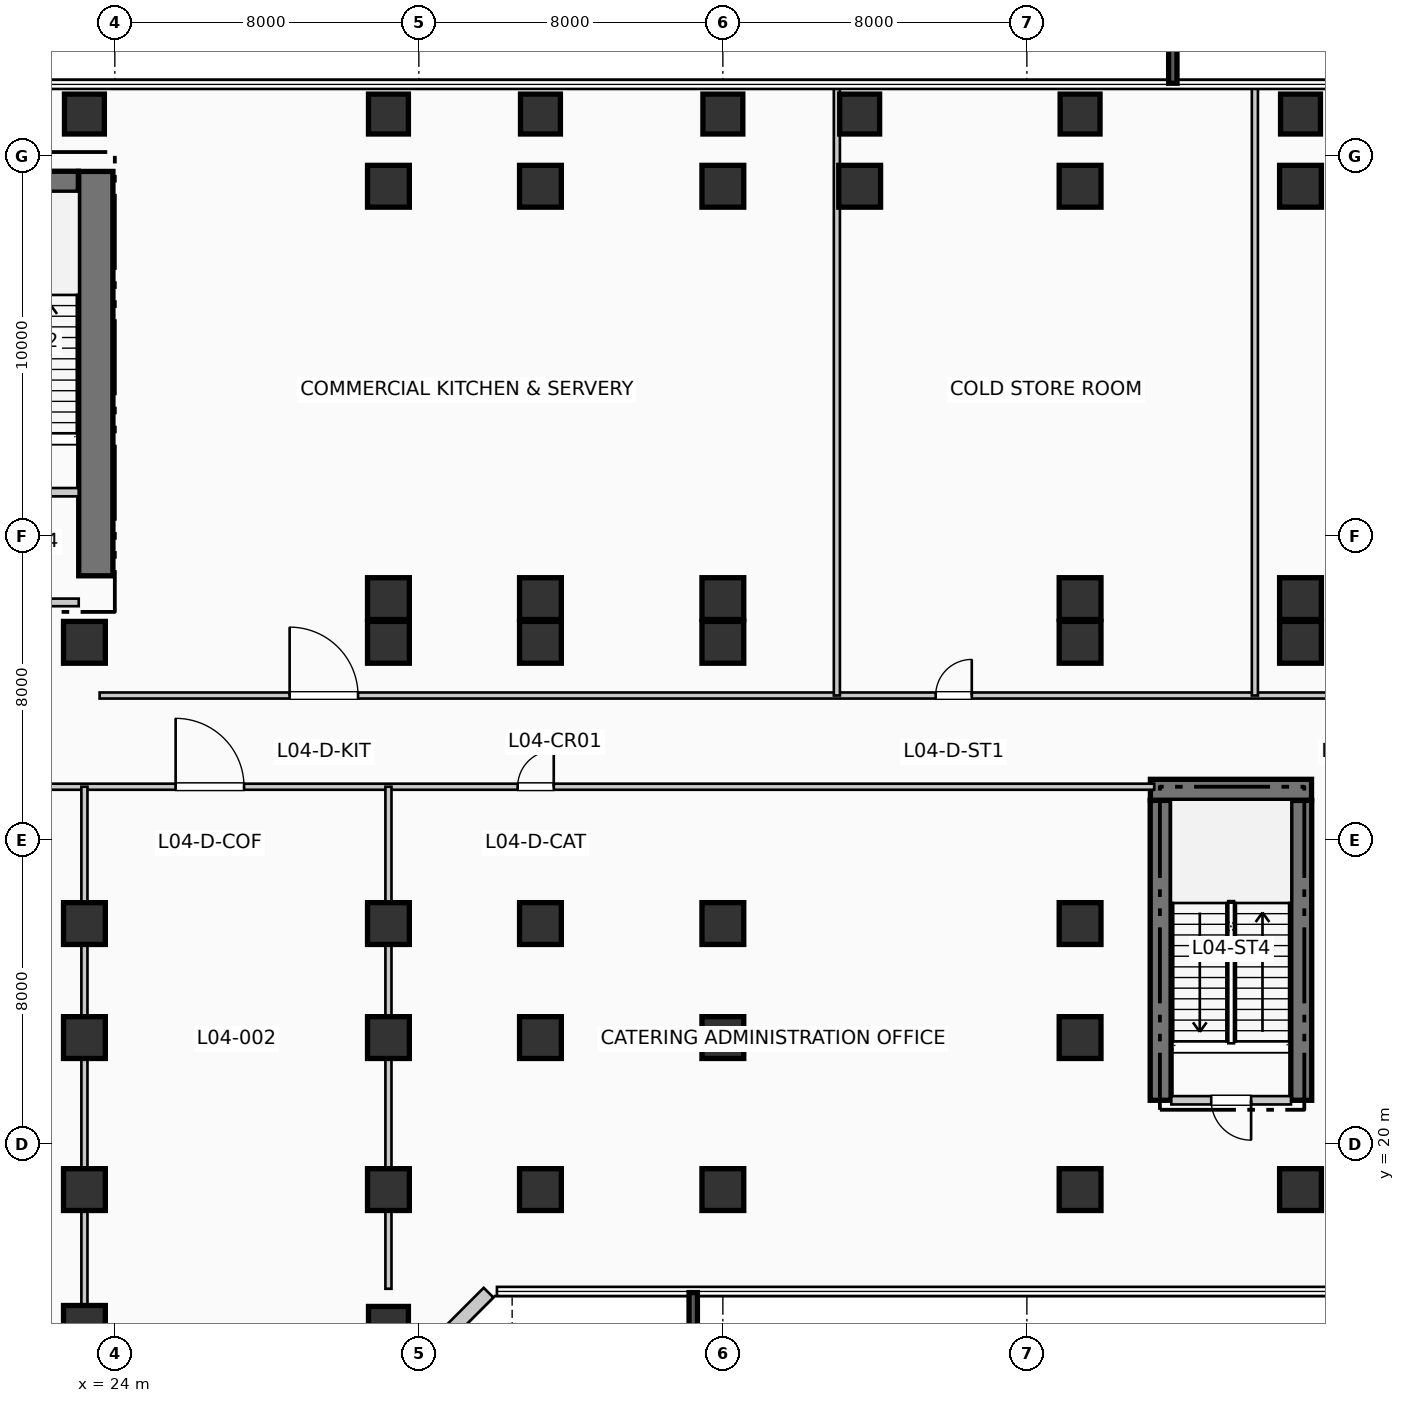
"""IFC4 building model, lengths in metres.
Left out: names, types, materials, properties, quantities, classifications, styles, units other than length and angle.
Written with IfcOpenShell. Run it as: python <this file> out.ifc"""

import sys

from ifc_helpers import new_model, si_unit, direction, frame, frame_2d, origin, origin_2d, place, context, subcontext, project, spatial, rectangle, extrude, element, fill, save


model = new_model("IFC4")
c1 = context("Model", 3, precision=1e-05, world=origin(), true_north=direction((0.0, 1.0)))
c2 = subcontext(c1, "Body", "Model", "MODEL_VIEW")
j1 = project(units=[si_unit("LENGTHUNIT", "METRE"), si_unit("PLANEANGLEUNIT", "RADIAN")], contexts=[c1])
p1 = place(None, origin())
s1 = spatial("IfcSite", under=j1, at=p1, CompositionType="ELEMENT")
p2 = place(p1, origin())
s2 = spatial("IfcBuilding", under=s1, at=p2, CompositionType="ELEMENT")
p3 = place(p2, frame((0.0, 0.0, 21.12)))
s3 = spatial("IfcBuildingStorey", under=s2, at=p3, CompositionType="ELEMENT", Elevation=21.12)
p4 = place(p3, frame((23.5, 34.95, 0.0), z_axis=(0.0, 0.0, 1.0), x_axis=(0.0, 1.0, 0.0)))
e1 = element("IfcWall", 1, at=p4, inside=s3, PredefinedType="SHEAR", context=c2, shape_type="SweptSolid", body=[
    extrude(rectangle(XDim=10.64, YDim=0.9, at=frame_2d((5.32, 0.0))), origin(), (0.0, 0.0, 1.0), 4.62),
])
p5 = place(p3, frame((19.35, 45.32, 0.0), z_axis=(0.0, 0.0, 1.0), x_axis=(1.0, 0.0, 0.0)))
e2 = element("IfcWall", 2, at=p5, inside=s3, PredefinedType="SHEAR", context=c2, shape_type="SweptSolid", body=[
    extrude(rectangle(XDim=3.69, YDim=0.55, at=frame_2d((1.845, 0.0))), origin(), (0.0, 0.0, 1.0), 4.62),
])
for number, where, z_axis, x_axis in (
    (3, (51.52, 21.15, 0.0), (0.0, 0.0, 1.0), (0.0, 1.0, 0.0)),
    (4, (55.22, 21.15, 0.0), (0.0, 0.0, 1.0), (0.0, 1.0, 0.0)),
):
    element("IfcWall", number, at=place(p3, frame(where, z_axis=z_axis, x_axis=x_axis)), inside=s3, PredefinedType="SHEAR", context=c2, shape_type="SweptSolid", body=[
        extrude(rectangle(XDim=7.89, YDim=0.55, at=frame_2d((3.945, 0.0))), origin(), (0.0, 0.0, 1.0), 4.62),
    ])
p6 = place(p3, frame((51.25, 29.32, 0.0), z_axis=(0.0, 0.0, 1.0), x_axis=(1.0, 0.0, 0.0)))
e5 = element("IfcWall", 5, at=p6, inside=s3, PredefinedType="SHEAR", context=c2, shape_type="SweptSolid", body=[
    extrude(rectangle(XDim=4.24, YDim=0.55, at=frame_2d((2.12, 0.0))), origin(), (0.0, 0.0, 1.0), 4.62),
])
for number, where, z_axis, x_axis in (
    (6, (23.2, 15.2, 0.0), (0.0, 0.0, 1.0), (1.0, 0.0, 0.0)),
    (7, (23.2, 18.8, 0.0), (0.0, 0.0, 1.0), (1.0, 0.0, 0.0)),
    (8, (23.2, 22.8, 0.0), (0.0, 0.0, 1.0), (1.0, 0.0, 0.0)),
    (9, (23.2, 25.8, 0.0), (0.0, 0.0, 1.0), (1.0, 0.0, 0.0)),
    (10, (23.2, 33.2, 0.0), (0.0, 0.0, 1.0), (1.0, 0.0, 0.0)),
):
    element("IfcColumn", number, at=place(p3, frame(where, z_axis=z_axis, x_axis=x_axis)), inside=s3, PredefinedType="COLUMN", context=c2, shape_type="SweptSolid", body=[
        extrude(rectangle(XDim=1.1, YDim=1.1, at=origin_2d()), origin(), (0.0, 0.0, 1.0), 4.62),
    ])
for number, where, z_axis, x_axis in (
    (11, (23.2, 47.1, 0.0), (0.0, 0.0, 1.0), (1.0, 0.0, 0.0)),
    (12, (31.2, 15.2, 0.0), (0.0, 0.0, 1.0), (1.0, 0.0, 0.0)),
):
    element("IfcColumn", number, at=place(p3, frame(where, z_axis=z_axis, x_axis=x_axis)), inside=s3, PredefinedType="COLUMN", context=c2, shape_type="SweptSolid", body=[
        extrude(rectangle(XDim=1.05, YDim=1.05, at=origin_2d()), origin(), (0.0, 0.0, 1.0), 4.62),
    ])
for number, where, z_axis, x_axis in (
    (13, (31.2, 18.8, 0.0), (0.0, 0.0, 1.0), (1.0, 0.0, 0.0)),
    (14, (31.2, 22.8, 0.0), (0.0, 0.0, 1.0), (1.0, 0.0, 0.0)),
    (15, (31.2, 25.8, 0.0), (0.0, 0.0, 1.0), (1.0, 0.0, 0.0)),
    (16, (31.2, 33.2, 0.0), (0.0, 0.0, 1.0), (1.0, 0.0, 0.0)),
    (17, (31.2, 34.35, 0.0), (0.0, 0.0, 1.0), (1.0, 0.0, 0.0)),
    (18, (31.2, 45.2, 0.0), (0.0, 0.0, 1.0), (1.0, 0.0, 0.0)),
):
    element("IfcColumn", number, at=place(p3, frame(where, z_axis=z_axis, x_axis=x_axis)), inside=s3, PredefinedType="COLUMN", context=c2, shape_type="SweptSolid", body=[
        extrude(rectangle(XDim=1.1, YDim=1.1, at=origin_2d()), origin(), (0.0, 0.0, 1.0), 4.62),
    ])
p7 = place(p3, frame((31.2, 47.1, 0.0), z_axis=(0.0, 0.0, 1.0), x_axis=(1.0, 0.0, 0.0)))
e19 = element("IfcColumn", 19, at=p7, inside=s3, PredefinedType="COLUMN", context=c2, shape_type="SweptSolid", body=[
    extrude(rectangle(XDim=1.05, YDim=1.05, at=origin_2d()), origin(), (0.0, 0.0, 1.0), 4.62),
])
for number, where, z_axis, x_axis in (
    (20, (35.2, 18.8, 0.0), (0.0, 0.0, 1.0), (1.0, 0.0, 0.0)),
    (21, (35.2, 22.8, 0.0), (0.0, 0.0, 1.0), (1.0, 0.0, 0.0)),
    (22, (35.2, 25.8, 0.0), (0.0, 0.0, 1.0), (1.0, 0.0, 0.0)),
    (23, (35.2, 33.2, 0.0), (0.0, 0.0, 1.0), (1.0, 0.0, 0.0)),
    (24, (35.2, 34.35, 0.0), (0.0, 0.0, 1.0), (1.0, 0.0, 0.0)),
    (25, (35.2, 45.2, 0.0), (0.0, 0.0, 1.0), (1.0, 0.0, 0.0)),
):
    element("IfcColumn", number, at=place(p3, frame(where, z_axis=z_axis, x_axis=x_axis)), inside=s3, PredefinedType="COLUMN", context=c2, shape_type="SweptSolid", body=[
        extrude(rectangle(XDim=1.1, YDim=1.1, at=origin_2d()), origin(), (0.0, 0.0, 1.0), 4.62),
    ])
p8 = place(p3, frame((35.2, 47.1, 0.0), z_axis=(0.0, 0.0, 1.0), x_axis=(1.0, 0.0, 0.0)))
e26 = element("IfcColumn", 26, at=p8, inside=s3, PredefinedType="COLUMN", context=c2, shape_type="SweptSolid", body=[
    extrude(rectangle(XDim=1.05, YDim=1.05, at=origin_2d()), origin(), (0.0, 0.0, 1.0), 4.62),
])
for number, where, z_axis, x_axis in (
    (27, (40.0, 18.8, 0.0), (0.0, 0.0, 1.0), (1.0, 0.0, 0.0)),
    (28, (40.0, 22.8, 0.0), (0.0, 0.0, 1.0), (1.0, 0.0, 0.0)),
    (29, (40.0, 25.8, 0.0), (0.0, 0.0, 1.0), (1.0, 0.0, 0.0)),
    (30, (40.0, 33.2, 0.0), (0.0, 0.0, 1.0), (1.0, 0.0, 0.0)),
    (31, (40.0, 34.35, 0.0), (0.0, 0.0, 1.0), (1.0, 0.0, 0.0)),
    (32, (40.0, 45.2, 0.0), (0.0, 0.0, 1.0), (1.0, 0.0, 0.0)),
):
    element("IfcColumn", number, at=place(p3, frame(where, z_axis=z_axis, x_axis=x_axis)), inside=s3, PredefinedType="COLUMN", context=c2, shape_type="SweptSolid", body=[
        extrude(rectangle(XDim=1.1, YDim=1.1, at=origin_2d()), origin(), (0.0, 0.0, 1.0), 4.62),
    ])
p9 = place(p3, frame((40.0, 47.1, 0.0), z_axis=(0.0, 0.0, 1.0), x_axis=(1.0, 0.0, 0.0)))
e33 = element("IfcColumn", 33, at=p9, inside=s3, PredefinedType="COLUMN", context=c2, shape_type="SweptSolid", body=[
    extrude(rectangle(XDim=1.05, YDim=1.05, at=origin_2d()), origin(), (0.0, 0.0, 1.0), 4.62),
])
p10 = place(p3, frame((43.6, 45.2, 0.0), z_axis=(0.0, 0.0, 1.0), x_axis=(1.0, 0.0, 0.0)))
e34 = element("IfcColumn", 34, at=p10, inside=s3, PredefinedType="COLUMN", context=c2, shape_type="SweptSolid", body=[
    extrude(rectangle(XDim=1.1, YDim=1.1, at=origin_2d()), origin(), (0.0, 0.0, 1.0), 4.62),
])
p11 = place(p3, frame((43.6, 47.1, 0.0), z_axis=(0.0, 0.0, 1.0), x_axis=(1.0, 0.0, 0.0)))
e35 = element("IfcColumn", 35, at=p11, inside=s3, PredefinedType="COLUMN", context=c2, shape_type="SweptSolid", body=[
    extrude(rectangle(XDim=1.05, YDim=1.05, at=origin_2d()), origin(), (0.0, 0.0, 1.0), 4.62),
])
for number, where, z_axis, x_axis in (
    (36, (49.4, 18.8, 0.0), (0.0, 0.0, 1.0), (1.0, 0.0, 0.0)),
    (37, (49.4, 22.8, 0.0), (0.0, 0.0, 1.0), (1.0, 0.0, 0.0)),
    (38, (49.4, 25.8, 0.0), (0.0, 0.0, 1.0), (1.0, 0.0, 0.0)),
    (39, (49.4, 33.2, 0.0), (0.0, 0.0, 1.0), (1.0, 0.0, 0.0)),
    (40, (49.4, 34.35, 0.0), (0.0, 0.0, 1.0), (1.0, 0.0, 0.0)),
    (41, (49.4, 45.2, 0.0), (0.0, 0.0, 1.0), (1.0, 0.0, 0.0)),
):
    element("IfcColumn", number, at=place(p3, frame(where, z_axis=z_axis, x_axis=x_axis)), inside=s3, PredefinedType="COLUMN", context=c2, shape_type="SweptSolid", body=[
        extrude(rectangle(XDim=1.1, YDim=1.1, at=origin_2d()), origin(), (0.0, 0.0, 1.0), 4.62),
    ])
p12 = place(p3, frame((49.4, 47.1, 0.0), z_axis=(0.0, 0.0, 1.0), x_axis=(1.0, 0.0, 0.0)))
e42 = element("IfcColumn", 42, at=p12, inside=s3, PredefinedType="COLUMN", context=c2, shape_type="SweptSolid", body=[
    extrude(rectangle(XDim=1.05, YDim=1.05, at=origin_2d()), origin(), (0.0, 0.0, 1.0), 4.62),
])
for number, where, z_axis, x_axis in (
    (43, (55.2, 18.8, 0.0), (0.0, 0.0, 1.0), (1.0, 0.0, 0.0)),
    (44, (55.2, 33.2, 0.0), (0.0, 0.0, 1.0), (1.0, 0.0, 0.0)),
    (45, (55.2, 34.35, 0.0), (0.0, 0.0, 1.0), (1.0, 0.0, 0.0)),
    (46, (55.2, 45.2, 0.0), (0.0, 0.0, 1.0), (1.0, 0.0, 0.0)),
):
    element("IfcColumn", number, at=place(p3, frame(where, z_axis=z_axis, x_axis=x_axis)), inside=s3, PredefinedType="COLUMN", context=c2, shape_type="SweptSolid", body=[
        extrude(rectangle(XDim=1.1, YDim=1.1, at=origin_2d()), origin(), (0.0, 0.0, 1.0), 4.62),
    ])
p13 = place(p3, frame((55.2, 47.1, 0.0), z_axis=(0.0, 0.0, 1.0), x_axis=(1.0, 0.0, 0.0)))
e47 = element("IfcColumn", 47, at=p13, inside=s3, PredefinedType="COLUMN", context=c2, shape_type="SweptSolid", body=[
    extrude(rectangle(XDim=1.05, YDim=1.05, at=origin_2d()), origin(), (0.0, 0.0, 1.0), 4.62),
])
p14 = place(p3, frame((31.912, 14.166, 0.0), z_axis=(0.0, 0.0, 1.0), x_axis=(0.707106781187, 0.707106781187, 0.0)))
e48 = element("IfcWall", 48, at=p14, inside=s3, PredefinedType="SOLIDWALL", context=c2, shape_type="SweptSolid", body=[
    extrude(rectangle(XDim=2.718, YDim=0.36, at=frame_2d((1.359, 0.0))), origin(), (0.0, 0.0, 1.0), 4.2),
])
p15 = place(p3, frame((19.9, 37.15, 0.0), z_axis=(0.0, 0.0, 1.0), x_axis=(1.0, 0.0, 0.0)))
e49 = element("IfcWall", 49, at=p15, inside=s3, PredefinedType="PARTITIONING", context=c2, shape_type="SweptSolid", body=[
    extrude(rectangle(XDim=3.15, YDim=0.22, at=frame_2d((1.575, 0.0))), origin(), (0.0, 0.0, 1.0), 4.2),
])
p16 = place(p15, frame((2.05, 0.0, 0.0), z_axis=(0.0, 0.0, 1.0), x_axis=(-1.0, 0.0, 0.0)))
e50 = element("IfcOpeningElement", 50, at=p16, cuts=e49, PredefinedType="OPENING", context=c2, shape_type="SweptSolid", body=[
    extrude(rectangle(XDim=1.05, YDim=2.15, at=frame_2d((0.525, 1.075))), frame((0.0, 0.12, 0.0), z_axis=(0.0, -1.0, 0.0), x_axis=(1.0, 0.0, 0.0)), (0.0, 0.0, 1.0), 0.24),
])
p17 = place(p3, frame((19.8, 34.25, 0.0), z_axis=(0.0, 0.0, 1.0), x_axis=(1.0, 0.0, 0.0)))
e51 = element("IfcWall", 51, at=p17, inside=s3, PredefinedType="PARTITIONING", context=c2, shape_type="SweptSolid", body=[
    extrude(rectangle(XDim=3.25, YDim=0.2, at=frame_2d((1.625, 0.0))), origin(), (0.0, 0.0, 1.0), 4.2),
])
p18 = place(p17, frame((2.15, 0.0, 0.0), z_axis=(0.0, 0.0, 1.0), x_axis=(-1.0, 0.0, 0.0)))
e52 = element("IfcOpeningElement", 52, at=p18, cuts=e51, PredefinedType="OPENING", context=c2, shape_type="SweptSolid", body=[
    extrude(rectangle(XDim=1.1, YDim=2.15, at=frame_2d((0.55, 1.075))), frame((0.0, 0.11, 0.0), z_axis=(0.0, -1.0, 0.0), x_axis=(1.0, 0.0, 0.0)), (0.0, 0.0, 1.0), 0.22),
])
p19 = place(p3, frame((51.8, 21.15, 0.0), z_axis=(0.0, 0.0, 1.0), x_axis=(1.0, 0.0, 0.0)))
e53 = element("IfcWall", 53, at=p19, inside=s3, PredefinedType="PARTITIONING", context=c2, shape_type="SweptSolid", body=[
    extrude(rectangle(XDim=3.15, YDim=0.22, at=frame_2d((1.575, 0.0))), origin(), (0.0, 0.0, 1.0), 4.2),
])
p20 = place(p19, frame((2.1, 0.0, 0.0), z_axis=(0.0, 0.0, 1.0), x_axis=(-1.0, 0.0, 0.0)))
e54 = element("IfcOpeningElement", 54, at=p20, cuts=e53, PredefinedType="OPENING", context=c2, shape_type="SweptSolid", body=[
    extrude(rectangle(XDim=1.05, YDim=2.15, at=frame_2d((0.525, 1.075))), frame((0.0, 0.12, 0.0), z_axis=(0.0, -1.0, 0.0), x_axis=(1.0, 0.0, 0.0)), (0.0, 0.0, 1.0), 0.24),
])
p21 = place(p3, frame((7.6, 29.4, 0.0), z_axis=(0.0, 0.0, 1.0), x_axis=(1.0, 0.0, 0.0)))
e55 = element("IfcWall", 55, at=p21, inside=s3, PredefinedType="PARTITIONING", context=c2, shape_type="SweptSolid", body=[
    extrude(rectangle(XDim=43.75, YDim=0.16, at=frame_2d((21.875, 0.0))), origin(), (0.0, 0.0, 1.0), 3.855),
])
p22 = place(p21, frame((3.0, 0.0, 0.0)))
e56 = element("IfcOpeningElement", 56, at=p22, cuts=e55, PredefinedType="OPENING", context=c2, shape_type="SweptSolid", body=[
    extrude(rectangle(XDim=1.8, YDim=2.3, at=frame_2d((0.9, 1.15))), frame((0.0, 0.09, 0.0), z_axis=(0.0, -1.0, 0.0), x_axis=(1.0, 0.0, 0.0)), (0.0, 0.0, 1.0), 0.18),
])
p23 = place(p21, frame((11.5, 0.0, 0.0)))
e57 = element("IfcOpeningElement", 57, at=p23, cuts=e55, PredefinedType="OPENING", context=c2, shape_type="SweptSolid", body=[
    extrude(rectangle(XDim=1.8, YDim=2.3, at=frame_2d((0.9, 1.15))), frame((0.0, 0.09, 0.0), z_axis=(0.0, -1.0, 0.0), x_axis=(1.0, 0.0, 0.0)), (0.0, 0.0, 1.0), 0.18),
])
p24 = place(p21, frame((18.0, 0.0, 0.0)))
e58 = element("IfcOpeningElement", 58, at=p24, cuts=e55, PredefinedType="OPENING", context=c2, shape_type="SweptSolid", body=[
    extrude(rectangle(XDim=1.8, YDim=2.3, at=frame_2d((0.9, 1.15))), frame((0.0, 0.09, 0.0), z_axis=(0.0, -1.0, 0.0), x_axis=(1.0, 0.0, 0.0)), (0.0, 0.0, 1.0), 0.18),
])
p25 = place(p21, frame((27.0, 0.0, 0.0)))
e59 = element("IfcOpeningElement", 59, at=p25, cuts=e55, PredefinedType="OPENING", context=c2, shape_type="SweptSolid", body=[
    extrude(rectangle(XDim=0.95, YDim=2.15, at=frame_2d((0.475, 1.075))), frame((0.0, 0.09, 0.0), z_axis=(0.0, -1.0, 0.0), x_axis=(1.0, 0.0, 0.0)), (0.0, 0.0, 1.0), 0.18),
])
p26 = place(p3, frame((23.2, -1.81, 0.0), z_axis=(0.0, 0.0, 1.0), x_axis=(0.0, 1.0, 0.0)))
e60 = element("IfcWall", 60, at=p26, inside=s3, PredefinedType="PARTITIONING", context=c2, shape_type="SweptSolid", body=[
    extrude(rectangle(XDim=31.21, YDim=0.16, at=frame_2d((15.605, 0.0))), origin(), (0.0, 0.0, 1.0), 3.385),
])
p27 = place(p3, frame((31.2, 16.19, 0.0), z_axis=(0.0, 0.0, 1.0), x_axis=(0.0, 1.0, 0.0)))
e61 = element("IfcWall", 61, at=p27, inside=s3, PredefinedType="PARTITIONING", context=c2, shape_type="SweptSolid", body=[
    extrude(rectangle(XDim=13.21, YDim=0.16, at=frame_2d((6.605, 0.0))), origin(), (0.0, 0.0, 1.0), 3.385),
])
p28 = place(p3, frame((23.6, 31.8, 0.0), z_axis=(0.0, 0.0, 1.0), x_axis=(1.0, 0.0, 0.0)))
e62 = element("IfcWall", 62, at=p28, inside=s3, PredefinedType="PARTITIONING", context=c2, shape_type="SweptSolid", body=[
    extrude(rectangle(XDim=42.21, YDim=0.16, at=frame_2d((21.105, 0.0))), origin(), (0.0, 0.0, 1.0), 4.2),
])
p29 = place(p28, frame((5.0, 0.0, 0.0)))
e63 = element("IfcOpeningElement", 63, at=p29, cuts=e62, PredefinedType="OPENING", context=c2, shape_type="SweptSolid", body=[
    extrude(rectangle(XDim=1.8, YDim=2.3, at=frame_2d((0.9, 1.15))), frame((0.0, 0.09, 0.0), z_axis=(0.0, -1.0, 0.0), x_axis=(1.0, 0.0, 0.0)), (0.0, 0.0, 1.0), 0.18),
])
p30 = place(p28, frame((22.0, 0.0, 0.0)))
e64 = element("IfcOpeningElement", 64, at=p30, cuts=e62, PredefinedType="OPENING", context=c2, shape_type="SweptSolid", body=[
    extrude(rectangle(XDim=0.95, YDim=2.1, at=frame_2d((0.475, 1.05))), frame((0.0, 0.09, 0.0), z_axis=(0.0, -1.0, 0.0), x_axis=(1.0, 0.0, 0.0)), (0.0, 0.0, 1.0), 0.18),
])
p31 = place(p28, frame((33.0, 0.0, 0.0)))
e65 = element("IfcOpeningElement", 65, at=p31, cuts=e62, PredefinedType="OPENING", context=c2, shape_type="SweptSolid", body=[
    extrude(rectangle(XDim=0.95, YDim=2.1, at=frame_2d((0.475, 1.05))), frame((0.0, 0.09, 0.0), z_axis=(0.0, -1.0, 0.0), x_axis=(1.0, 0.0, 0.0)), (0.0, 0.0, 1.0), 0.18),
])
for number, where, z_axis, x_axis in (
    (66, (43.0, 31.8, 0.0), (0.0, 0.0, 1.0), (0.0, 1.0, 0.0)),
    (67, (54.0, 31.8, 0.0), (0.0, 0.0, 1.0), (0.0, 1.0, 0.0)),
):
    element("IfcWall", number, at=place(p3, frame(where, z_axis=z_axis, x_axis=x_axis)), inside=s3, PredefinedType="PARTITIONING", context=c2, shape_type="SweptSolid", body=[
        extrude(rectangle(XDim=16.01, YDim=0.16, at=frame_2d((8.005, 0.0))), origin(), (0.0, 0.0, 1.0), 4.2),
    ])
p32 = place(p20, origin())
e68 = element("IfcDoor", 68, at=p32, inside=s3, OperationType="SINGLE_SWING_RIGHT", PredefinedType="DOOR", context=c2, shape_type="SweptSolid", body=[
    extrude(rectangle(XDim=1.05, YDim=2.15, at=frame_2d((0.525, 1.075))), frame((0.0, 0.025, 0.0), z_axis=(0.0, -1.0, 0.0), x_axis=(1.0, 0.0, 0.0)), (0.0, 0.0, 1.0), 0.05),
])
fill(e54, e68)
p33 = place(p24, origin())
e69 = element("IfcDoor", 69, at=p33, inside=s3, OperationType="SINGLE_SWING_LEFT", PredefinedType="DOOR", context=c2, shape_type="SweptSolid", body=[
    extrude(rectangle(XDim=1.8, YDim=2.3, at=frame_2d((0.9, 1.15))), frame((0.0, 0.025, 0.0), z_axis=(0.0, -1.0, 0.0), x_axis=(1.0, 0.0, 0.0)), (0.0, 0.0, 1.0), 0.05),
])
fill(e58, e69)
p34 = place(p25, origin())
e70 = element("IfcDoor", 70, at=p34, inside=s3, OperationType="SINGLE_SWING_RIGHT", PredefinedType="DOOR", context=c2, shape_type="SweptSolid", body=[
    extrude(rectangle(XDim=0.95, YDim=2.15, at=frame_2d((0.475, 1.075))), frame((0.0, 0.025, 0.0), z_axis=(0.0, -1.0, 0.0), x_axis=(1.0, 0.0, 0.0)), (0.0, 0.0, 1.0), 0.05),
])
fill(e59, e70)
p35 = place(p29, origin())
e71 = element("IfcDoor", 71, at=p35, inside=s3, OperationType="SINGLE_SWING_LEFT", PredefinedType="DOOR", context=c2, shape_type="SweptSolid", body=[
    extrude(rectangle(XDim=1.8, YDim=2.3, at=frame_2d((0.9, 1.15))), frame((0.0, 0.025, 0.0), z_axis=(0.0, -1.0, 0.0), x_axis=(1.0, 0.0, 0.0)), (0.0, 0.0, 1.0), 0.05),
])
fill(e63, e71)
p36 = place(p30, origin())
e72 = element("IfcDoor", 72, at=p36, inside=s3, OperationType="SINGLE_SWING_RIGHT", PredefinedType="DOOR", context=c2, shape_type="SweptSolid", body=[
    extrude(rectangle(XDim=0.95, YDim=2.1, at=frame_2d((0.475, 1.05))), frame((0.0, 0.025, 0.0), z_axis=(0.0, -1.0, 0.0), x_axis=(1.0, 0.0, 0.0)), (0.0, 0.0, 1.0), 0.05),
])
fill(e64, e72)
save(model, sys.argv[1])
